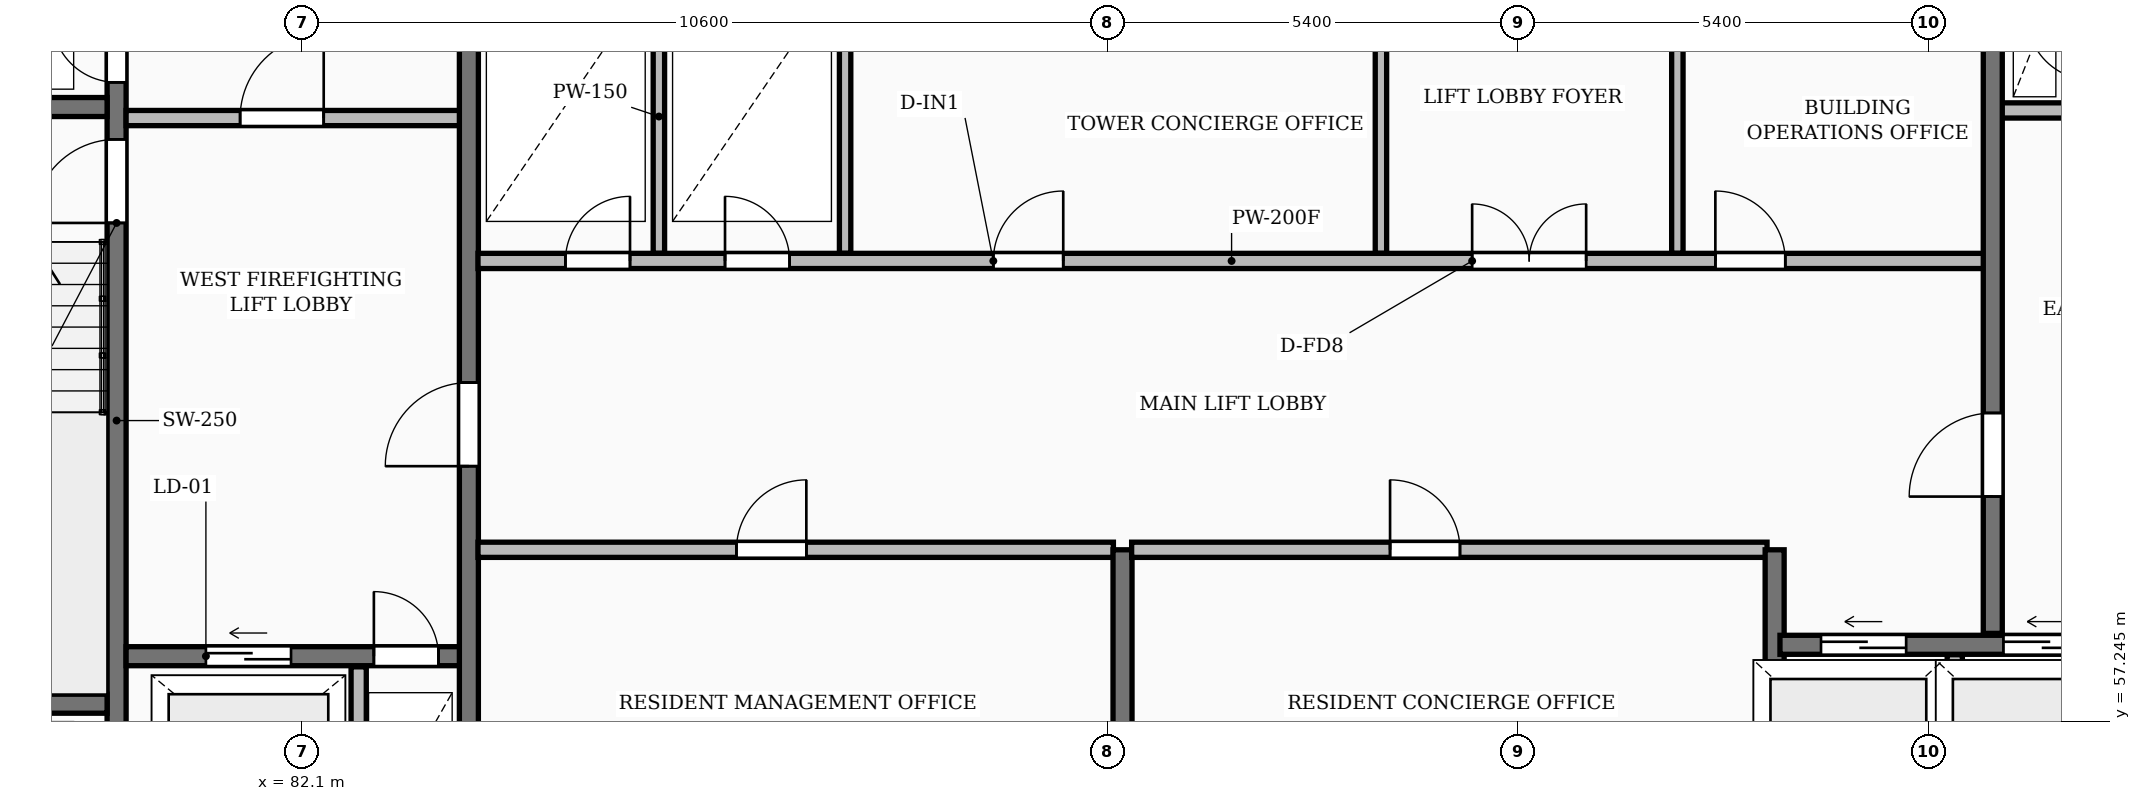
"""IFC4 building model, lengths in metres.
Left out: names, types, materials, properties, quantities, classifications, styles, units other than length and angle.
Written with IfcOpenShell. Run it as: python <this file> out.ifc"""

import sys

from ifc_helpers import new_model, si_unit, direction, frame, frame_2d, origin, place, context, subcontext, project, spatial, rectangle, extrude, element, fill, save


model = new_model("IFC4")
c1 = context("Model", 3, precision=1e-05, world=origin(), true_north=direction((0.0, 1.0)))
c2 = subcontext(c1, "Body", "Model", "MODEL_VIEW")
j1 = project(units=[si_unit("LENGTHUNIT", "METRE"), si_unit("PLANEANGLEUNIT", "RADIAN")], contexts=[c1])
p1 = place(None, origin())
s1 = spatial("IfcSite", under=j1, at=p1, CompositionType="ELEMENT")
p2 = place(p1, origin())
s2 = spatial("IfcBuilding", under=s1, at=p2, CompositionType="ELEMENT")
p3 = place(p2, frame((0.0, 0.0, 188.1)))
s3 = spatial("IfcBuildingStorey", under=s2, at=p3, CompositionType="ELEMENT", Elevation=188.1)
p4 = place(p3, frame((79.665, 55.4, 0.0), z_axis=(0.0, 0.0, 1.0), x_axis=(0.0, 1.0, 0.0)))
e1 = element("IfcWall", 1, at=p4, inside=s3, PredefinedType="SHEAR", context=c2, shape_type="SweptSolid", body=[
    extrude(rectangle(XDim=11.6, YDim=0.25, at=frame_2d((5.8, 0.0))), origin(), (0.0, 0.0, 1.0), 3.25),
])
p5 = place(p4, frame((0.55, 0.0, 0.0)))
e2 = element("IfcOpeningElement", 2, at=p5, cuts=e1, PredefinedType="OPENING", context=c2, shape_type="SweptSolid", body=[
    extrude(rectangle(XDim=0.85, YDim=2.05, at=frame_2d((0.425, 1.025))), frame((0.0, 0.135, 0.0), z_axis=(0.0, -1.0, 0.0), x_axis=(1.0, 0.0, 0.0)), (0.0, 0.0, 1.0), 0.27),
])
p6 = place(p4, frame((8.4, 0.0, 0.0)))
e3 = element("IfcOpeningElement", 3, at=p6, cuts=e1, PredefinedType="OPENING", context=c2, shape_type="SweptSolid", body=[
    extrude(rectangle(XDim=1.1, YDim=2.1, at=frame_2d((0.55, 1.05))), frame((0.0, 0.135, 0.0), z_axis=(0.0, -1.0, 0.0), x_axis=(1.0, 0.0, 0.0)), (0.0, 0.0, 1.0), 0.27),
])
p7 = place(p4, frame((10.25, 0.0, 0.0)))
e4 = element("IfcOpeningElement", 4, at=p7, cuts=e1, PredefinedType="OPENING", context=c2, shape_type="SweptSolid", body=[
    extrude(rectangle(XDim=0.85, YDim=2.05, at=frame_2d((0.425, 1.025))), frame((0.0, 0.135, 0.0), z_axis=(0.0, -1.0, 0.0), x_axis=(1.0, 0.0, 0.0)), (0.0, 0.0, 1.0), 0.27),
])
for number, where, z_axis, x_axis in (
    (5, (76.3, 57.475, 0.0), (0.0, 0.0, 1.0), (1.0, 0.0, 0.0)),
    (6, (76.3, 65.325, 0.0), (0.0, 0.0, 1.0), (1.0, 0.0, 0.0)),
):
    element("IfcWall", number, at=place(p3, frame(where, z_axis=z_axis, x_axis=x_axis)), inside=s3, PredefinedType="SHEAR", context=c2, shape_type="SweptSolid", body=[
        extrude(rectangle(XDim=3.24, YDim=0.25, at=frame_2d((1.62, 0.0))), origin(), (0.0, 0.0, 1.0), 3.25),
    ])
p8 = place(p3, frame((79.79, 58.1, 0.0), z_axis=(0.0, 0.0, 1.0), x_axis=(1.0, 0.0, 0.0)))
e7 = element("IfcWall", 7, at=p8, inside=s3, PredefinedType="SHEAR", context=c2, shape_type="SweptSolid", body=[
    extrude(rectangle(XDim=4.39, YDim=0.25, at=frame_2d((2.195, 0.0))), origin(), (0.0, 0.0, 1.0), 3.25),
])
p9 = place(p8, frame((1.05, 0.0, 0.0)))
e8 = element("IfcOpeningElement", 8, at=p9, cuts=e7, PredefinedType="OPENING", context=c2, shape_type="SweptSolid", body=[
    extrude(rectangle(XDim=1.12, YDim=2.12, at=frame_2d((0.56, 1.06))), frame((0.0, 0.135, 0.0), z_axis=(0.0, -1.0, 0.0), x_axis=(1.0, 0.0, 0.0)), (0.0, 0.0, 1.0), 0.27),
])
p10 = place(p8, frame((3.26, 0.0, 0.0)))
e9 = element("IfcOpeningElement", 9, at=p10, cuts=e7, PredefinedType="OPENING", context=c2, shape_type="SweptSolid", body=[
    extrude(rectangle(XDim=0.85, YDim=2.05, at=frame_2d((0.425, 1.025))), frame((0.0, 0.135, 0.0), z_axis=(0.0, -1.0, 0.0), x_axis=(1.0, 0.0, 0.0)), (0.0, 0.0, 1.0), 0.27),
])
p11 = place(p3, frame((82.85, 55.4, 0.0), z_axis=(0.0, 0.0, 1.0), x_axis=(0.0, 1.0, 0.0)))
e10 = element("IfcWall", 10, at=p11, inside=s3, PredefinedType="PARTITIONING", context=c2, shape_type="SweptSolid", body=[
    extrude(rectangle(XDim=2.56, YDim=0.2, at=frame_2d((1.28, 0.0))), origin(), (0.0, 0.0, 1.0), 2.97),
])
p12 = place(p3, frame((79.79, 65.18, 0.0), z_axis=(0.0, 0.0, 1.0), x_axis=(1.0, 0.0, 0.0)))
e11 = element("IfcWall", 11, at=p12, inside=s3, PredefinedType="PARTITIONING", context=c2, shape_type="SweptSolid", body=[
    extrude(rectangle(XDim=4.39, YDim=0.2, at=frame_2d((2.195, 0.0))), origin(), (0.0, 0.0, 1.0), 2.97),
])
p13 = place(p12, frame((1.5, 0.0, 0.0)))
e12 = element("IfcOpeningElement", 12, at=p13, cuts=e11, PredefinedType="OPENING", context=c2, shape_type="SweptSolid", body=[
    extrude(rectangle(XDim=1.1, YDim=2.1, at=frame_2d((0.55, 1.05))), frame((0.0, 0.11, 0.0), z_axis=(0.0, -1.0, 0.0), x_axis=(1.0, 0.0, 0.0)), (0.0, 0.0, 1.0), 0.22),
])
p14 = place(p3, frame((84.3, 55.4, 0.0), z_axis=(0.0, 0.0, 1.0), x_axis=(0.0, 1.0, 0.0)))
e13 = element("IfcWall", 13, at=p14, inside=s3, PredefinedType="SHEAR", context=c2, shape_type="SweptSolid", body=[
    extrude(rectangle(XDim=11.6, YDim=0.25, at=frame_2d((5.8, 0.0))), origin(), (0.0, 0.0, 1.0), 3.25),
])
p15 = place(p14, frame((5.2, 0.0, 0.0)))
e14 = element("IfcOpeningElement", 14, at=p15, cuts=e13, PredefinedType="OPENING", context=c2, shape_type="SweptSolid", body=[
    extrude(rectangle(XDim=1.1, YDim=2.1, at=frame_2d((0.55, 1.05))), frame((0.0, 0.135, 0.0), z_axis=(0.0, -1.0, 0.0), x_axis=(1.0, 0.0, 0.0)), (0.0, 0.0, 1.0), 0.27),
])
p16 = place(p3, frame((84.42, 59.5, 0.0), z_axis=(0.0, 0.0, 1.0), x_axis=(1.0, 0.0, 0.0)))
e15 = element("IfcWall", 15, at=p16, inside=s3, PredefinedType="PARTITIONING", context=c2, shape_type="SweptSolid", body=[
    extrude(rectangle(XDim=8.36, YDim=0.2, at=frame_2d((4.18, 0.0))), origin(), (0.0, 0.0, 1.0), 2.97),
])
p17 = place(p16, frame((3.4, 0.0, 0.0)))
e16 = element("IfcOpeningElement", 16, at=p17, cuts=e15, PredefinedType="OPENING", context=c2, shape_type="SweptSolid", body=[
    extrude(rectangle(XDim=0.92, YDim=2.08, at=frame_2d((0.46, 1.04))), frame((0.0, 0.11, 0.0), z_axis=(0.0, -1.0, 0.0), x_axis=(1.0, 0.0, 0.0)), (0.0, 0.0, 1.0), 0.22),
])
p18 = place(p3, frame((92.9, 55.4, 0.0), z_axis=(0.0, 0.0, 1.0), x_axis=(0.0, 1.0, 0.0)))
e17 = element("IfcWall", 17, at=p18, inside=s3, PredefinedType="SHEAR", context=c2, shape_type="SweptSolid", body=[
    extrude(rectangle(XDim=4.1, YDim=0.25, at=frame_2d((2.05, 0.0))), origin(), (0.0, 0.0, 1.0), 3.25),
])
p19 = place(p3, frame((93.02, 59.5, 0.0), z_axis=(0.0, 0.0, 1.0), x_axis=(1.0, 0.0, 0.0)))
e18 = element("IfcWall", 18, at=p19, inside=s3, PredefinedType="PARTITIONING", context=c2, shape_type="SweptSolid", body=[
    extrude(rectangle(XDim=8.36, YDim=0.2, at=frame_2d((4.18, 0.0))), origin(), (0.0, 0.0, 1.0), 2.97),
])
p20 = place(p19, frame((3.4, 0.0, 0.0)))
e19 = element("IfcOpeningElement", 19, at=p20, cuts=e18, PredefinedType="OPENING", context=c2, shape_type="SweptSolid", body=[
    extrude(rectangle(XDim=0.92, YDim=2.08, at=frame_2d((0.46, 1.04))), frame((0.0, 0.11, 0.0), z_axis=(0.0, -1.0, 0.0), x_axis=(1.0, 0.0, 0.0)), (0.0, 0.0, 1.0), 0.22),
])
p21 = place(p3, frame((101.48, 55.4, 0.0), z_axis=(0.0, 0.0, 1.0), x_axis=(0.0, 1.0, 0.0)))
e20 = element("IfcWall", 20, at=p21, inside=s3, PredefinedType="SHEAR", context=c2, shape_type="SweptSolid", body=[
    extrude(rectangle(XDim=4.1, YDim=0.25, at=frame_2d((2.05, 0.0))), origin(), (0.0, 0.0, 1.0), 3.25),
])
p22 = place(p3, frame((103.85, 55.4, 0.0), z_axis=(0.0, 0.0, 1.0), x_axis=(0.0, 1.0, 0.0)))
e21 = element("IfcWall", 21, at=p22, inside=s3, PredefinedType="PARTITIONING", context=c2, shape_type="SweptSolid", body=[
    extrude(rectangle(XDim=2.72, YDim=0.2, at=frame_2d((1.36, 0.0))), origin(), (0.0, 0.0, 1.0), 2.97),
])
p23 = place(p3, frame((101.55, 58.25, 0.0), z_axis=(0.0, 0.0, 1.0), x_axis=(1.0, 0.0, 0.0)))
e22 = element("IfcWall", 22, at=p23, inside=s3, PredefinedType="SHEAR", context=c2, shape_type="SweptSolid", body=[
    extrude(rectangle(XDim=4.6, YDim=0.25, at=frame_2d((2.3, 0.0))), origin(), (0.0, 0.0, 1.0), 3.25),
])
p24 = place(p23, frame((0.54, 0.0, 0.0)))
e23 = element("IfcOpeningElement", 23, at=p24, cuts=e22, PredefinedType="OPENING", context=c2, shape_type="SweptSolid", body=[
    extrude(rectangle(XDim=1.12, YDim=2.12, at=frame_2d((0.56, 1.06))), frame((0.0, 0.135, 0.0), z_axis=(0.0, -1.0, 0.0), x_axis=(1.0, 0.0, 0.0)), (0.0, 0.0, 1.0), 0.27),
])
p25 = place(p23, frame((2.94, 0.0, 0.0)))
e24 = element("IfcOpeningElement", 24, at=p25, cuts=e22, PredefinedType="OPENING", context=c2, shape_type="SweptSolid", body=[
    extrude(rectangle(XDim=1.12, YDim=2.12, at=frame_2d((0.56, 1.06))), frame((0.0, 0.135, 0.0), z_axis=(0.0, -1.0, 0.0), x_axis=(1.0, 0.0, 0.0)), (0.0, 0.0, 1.0), 0.27),
])
for number, where, z_axis, x_axis in (
    (25, (86.8, 63.4, 0.0), (0.0, 0.0, 1.0), (0.0, 1.0, 0.0)),
    (26, (89.25, 63.4, 0.0), (0.0, 0.0, 1.0), (0.0, 1.0, 0.0)),
    (27, (96.3, 63.4, 0.0), (0.0, 0.0, 1.0), (0.0, 1.0, 0.0)),
    (28, (100.2, 63.4, 0.0), (0.0, 0.0, 1.0), (0.0, 1.0, 0.0)),
):
    element("IfcWall", number, at=place(p3, frame(where, z_axis=z_axis, x_axis=x_axis)), inside=s3, PredefinedType="PARTITIONING", context=c2, shape_type="SweptSolid", body=[
        extrude(rectangle(XDim=3.6, YDim=0.15, at=frame_2d((1.8, 0.0))), origin(), (0.0, 0.0, 1.0), 2.97),
    ])
p26 = place(p3, frame((84.42, 63.3, 0.0), z_axis=(0.0, 0.0, 1.0), x_axis=(1.0, 0.0, 0.0)))
e29 = element("IfcWall", 29, at=p26, inside=s3, PredefinedType="PARTITIONING", context=c2, shape_type="SweptSolid", body=[
    extrude(rectangle(XDim=19.83, YDim=0.2, at=frame_2d((9.915, 0.0))), origin(), (0.0, 0.0, 1.0), 2.97),
])
p27 = place(p26, frame((1.15, 0.0, 0.0)))
e30 = element("IfcOpeningElement", 30, at=p27, cuts=e29, PredefinedType="OPENING", context=c2, shape_type="SweptSolid", body=[
    extrude(rectangle(XDim=0.85, YDim=2.05, at=frame_2d((0.425, 1.025))), frame((0.0, 0.11, 0.0), z_axis=(0.0, -1.0, 0.0), x_axis=(1.0, 0.0, 0.0)), (0.0, 0.0, 1.0), 0.22),
])
p28 = place(p26, frame((3.25, 0.0, 0.0)))
e31 = element("IfcOpeningElement", 31, at=p28, cuts=e29, PredefinedType="OPENING", context=c2, shape_type="SweptSolid", body=[
    extrude(rectangle(XDim=0.85, YDim=2.05, at=frame_2d((0.425, 1.025))), frame((0.0, 0.11, 0.0), z_axis=(0.0, -1.0, 0.0), x_axis=(1.0, 0.0, 0.0)), (0.0, 0.0, 1.0), 0.22),
])
p29 = place(p26, frame((13.08, 0.0, 0.0)))
e32 = element("IfcOpeningElement", 32, at=p29, cuts=e29, PredefinedType="OPENING", context=c2, shape_type="SweptSolid", body=[
    extrude(rectangle(XDim=1.5, YDim=2.2, at=frame_2d((0.75, 1.1))), frame((0.0, 0.11, 0.0), z_axis=(0.0, -1.0, 0.0), x_axis=(1.0, 0.0, 0.0)), (0.0, 0.0, 1.0), 0.22),
])
p30 = place(p26, frame((6.78, 0.0, 0.0)))
e33 = element("IfcOpeningElement", 33, at=p30, cuts=e29, PredefinedType="OPENING", context=c2, shape_type="SweptSolid", body=[
    extrude(rectangle(XDim=0.92, YDim=2.08, at=frame_2d((0.46, 1.04))), frame((0.0, 0.11, 0.0), z_axis=(0.0, -1.0, 0.0), x_axis=(1.0, 0.0, 0.0)), (0.0, 0.0, 1.0), 0.22),
])
p31 = place(p26, frame((16.28, 0.0, 0.0)))
e34 = element("IfcOpeningElement", 34, at=p31, cuts=e29, PredefinedType="OPENING", context=c2, shape_type="SweptSolid", body=[
    extrude(rectangle(XDim=0.92, YDim=2.08, at=frame_2d((0.46, 1.04))), frame((0.0, 0.11, 0.0), z_axis=(0.0, -1.0, 0.0), x_axis=(1.0, 0.0, 0.0)), (0.0, 0.0, 1.0), 0.22),
])
p32 = place(p3, frame((104.45, 65.28, 0.0), z_axis=(0.0, 0.0, 1.0), x_axis=(1.0, 0.0, 0.0)))
e35 = element("IfcWall", 35, at=p32, inside=s3, PredefinedType="PARTITIONING", context=c2, shape_type="SweptSolid", body=[
    extrude(rectangle(XDim=1.2, YDim=0.2, at=frame_2d((0.6, 0.0))), origin(), (0.0, 0.0, 1.0), 2.97),
])
p33 = place(p3, frame((104.35, 58.4, 0.0), z_axis=(0.0, 0.0, 1.0), x_axis=(0.0, 1.0, 0.0)))
e36 = element("IfcWall", 36, at=p33, inside=s3, PredefinedType="SHEAR", context=c2, shape_type="SweptSolid", body=[
    extrude(rectangle(XDim=8.6, YDim=0.25, at=frame_2d((4.3, 0.0))), origin(), (0.0, 0.0, 1.0), 3.25),
])
p34 = place(p33, frame((1.8, 0.0, 0.0)))
e37 = element("IfcOpeningElement", 37, at=p34, cuts=e36, PredefinedType="OPENING", context=c2, shape_type="SweptSolid", body=[
    extrude(rectangle(XDim=1.1, YDim=2.1, at=frame_2d((0.55, 1.05))), frame((0.0, 0.135, 0.0), z_axis=(0.0, -1.0, 0.0), x_axis=(1.0, 0.0, 0.0)), (0.0, 0.0, 1.0), 0.27),
])
p35 = place(p6, origin())
e38 = element("IfcDoor", 38, at=p35, inside=s3, OperationType="SINGLE_SWING_LEFT", PredefinedType="DOOR", context=c2, shape_type="SweptSolid", body=[
    extrude(rectangle(XDim=1.1, YDim=2.1, at=frame_2d((0.55, 1.05))), frame((0.0, 0.025, 0.0), z_axis=(0.0, -1.0, 0.0), x_axis=(1.0, 0.0, 0.0)), (0.0, 0.0, 1.0), 0.05),
])
fill(e3, e38)
p36 = place(p7, origin())
e39 = element("IfcDoor", 39, at=p36, inside=s3, OperationType="SINGLE_SWING_RIGHT", PredefinedType="DOOR", context=c2, shape_type="SweptSolid", body=[
    extrude(rectangle(XDim=0.85, YDim=2.05, at=frame_2d((0.425, 1.025))), frame((0.0, 0.025, 0.0), z_axis=(0.0, -1.0, 0.0), x_axis=(1.0, 0.0, 0.0)), (0.0, 0.0, 1.0), 0.05),
])
fill(e4, e39)
p37 = place(p9, origin())
e40 = element("IfcDoor", 40, at=p37, inside=s3, OperationType="SLIDING_TO_LEFT", PredefinedType="DOOR", context=c2, shape_type="SweptSolid", body=[
    extrude(rectangle(XDim=1.12, YDim=2.12, at=frame_2d((0.56, 1.06))), frame((0.0, 0.025, 0.0), z_axis=(0.0, -1.0, 0.0), x_axis=(1.0, 0.0, 0.0)), (0.0, 0.0, 1.0), 0.05),
])
fill(e8, e40)
p38 = place(p10, origin())
e41 = element("IfcDoor", 41, at=p38, inside=s3, OperationType="SINGLE_SWING_LEFT", PredefinedType="DOOR", context=c2, shape_type="SweptSolid", body=[
    extrude(rectangle(XDim=0.85, YDim=2.05, at=frame_2d((0.425, 1.025))), frame((0.0, 0.025, 0.0), z_axis=(0.0, -1.0, 0.0), x_axis=(1.0, 0.0, 0.0)), (0.0, 0.0, 1.0), 0.05),
])
fill(e9, e41)
p39 = place(p13, origin())
e42 = element("IfcDoor", 42, at=p39, inside=s3, OperationType="SINGLE_SWING_RIGHT", PredefinedType="DOOR", context=c2, shape_type="SweptSolid", body=[
    extrude(rectangle(XDim=1.1, YDim=2.1, at=frame_2d((0.55, 1.05))), frame((0.0, 0.025, 0.0), z_axis=(0.0, -1.0, 0.0), x_axis=(1.0, 0.0, 0.0)), (0.0, 0.0, 1.0), 0.05),
])
fill(e12, e42)
p40 = place(p15, origin())
e43 = element("IfcDoor", 43, at=p40, inside=s3, OperationType="SINGLE_SWING_LEFT", PredefinedType="DOOR", context=c2, shape_type="SweptSolid", body=[
    extrude(rectangle(XDim=1.1, YDim=2.1, at=frame_2d((0.55, 1.05))), frame((0.0, 0.025, 0.0), z_axis=(0.0, -1.0, 0.0), x_axis=(1.0, 0.0, 0.0)), (0.0, 0.0, 1.0), 0.05),
])
fill(e14, e43)
p41 = place(p17, origin())
e44 = element("IfcDoor", 44, at=p41, inside=s3, OperationType="SINGLE_SWING_RIGHT", PredefinedType="DOOR", context=c2, shape_type="SweptSolid", body=[
    extrude(rectangle(XDim=0.92, YDim=2.08, at=frame_2d((0.46, 1.04))), frame((0.0, 0.025, 0.0), z_axis=(0.0, -1.0, 0.0), x_axis=(1.0, 0.0, 0.0)), (0.0, 0.0, 1.0), 0.05),
])
fill(e16, e44)
p42 = place(p20, origin())
e45 = element("IfcDoor", 45, at=p42, inside=s3, OperationType="SINGLE_SWING_LEFT", PredefinedType="DOOR", context=c2, shape_type="SweptSolid", body=[
    extrude(rectangle(XDim=0.92, YDim=2.08, at=frame_2d((0.46, 1.04))), frame((0.0, 0.025, 0.0), z_axis=(0.0, -1.0, 0.0), x_axis=(1.0, 0.0, 0.0)), (0.0, 0.0, 1.0), 0.05),
])
fill(e19, e45)
p43 = place(p24, origin())
e46 = element("IfcDoor", 46, at=p43, inside=s3, OperationType="SLIDING_TO_LEFT", PredefinedType="DOOR", context=c2, shape_type="SweptSolid", body=[
    extrude(rectangle(XDim=1.12, YDim=2.12, at=frame_2d((0.56, 1.06))), frame((0.0, 0.025, 0.0), z_axis=(0.0, -1.0, 0.0), x_axis=(1.0, 0.0, 0.0)), (0.0, 0.0, 1.0), 0.05),
])
fill(e23, e46)
p44 = place(p25, origin())
e47 = element("IfcDoor", 47, at=p44, inside=s3, OperationType="SLIDING_TO_LEFT", PredefinedType="DOOR", context=c2, shape_type="SweptSolid", body=[
    extrude(rectangle(XDim=1.12, YDim=2.12, at=frame_2d((0.56, 1.06))), frame((0.0, 0.025, 0.0), z_axis=(0.0, -1.0, 0.0), x_axis=(1.0, 0.0, 0.0)), (0.0, 0.0, 1.0), 0.05),
])
fill(e24, e47)
p45 = place(p27, origin())
e48 = element("IfcDoor", 48, at=p45, inside=s3, OperationType="SINGLE_SWING_RIGHT", PredefinedType="DOOR", context=c2, shape_type="SweptSolid", body=[
    extrude(rectangle(XDim=0.85, YDim=2.05, at=frame_2d((0.425, 1.025))), frame((0.0, 0.025, 0.0), z_axis=(0.0, -1.0, 0.0), x_axis=(1.0, 0.0, 0.0)), (0.0, 0.0, 1.0), 0.05),
])
fill(e30, e48)
p46 = place(p28, origin())
e49 = element("IfcDoor", 49, at=p46, inside=s3, OperationType="SINGLE_SWING_LEFT", PredefinedType="DOOR", context=c2, shape_type="SweptSolid", body=[
    extrude(rectangle(XDim=0.85, YDim=2.05, at=frame_2d((0.425, 1.025))), frame((0.0, 0.025, 0.0), z_axis=(0.0, -1.0, 0.0), x_axis=(1.0, 0.0, 0.0)), (0.0, 0.0, 1.0), 0.05),
])
fill(e31, e49)
p47 = place(p29, origin())
e50 = element("IfcDoor", 50, at=p47, inside=s3, OperationType="DOUBLE_DOOR_SINGLE_SWING", PredefinedType="DOOR", context=c2, shape_type="SweptSolid", body=[
    extrude(rectangle(XDim=1.5, YDim=2.2, at=frame_2d((0.75, 1.1))), frame((0.0, 0.025, 0.0), z_axis=(0.0, -1.0, 0.0), x_axis=(1.0, 0.0, 0.0)), (0.0, 0.0, 1.0), 0.05),
])
fill(e32, e50)
p48 = place(p30, origin())
e51 = element("IfcDoor", 51, at=p48, inside=s3, OperationType="SINGLE_SWING_RIGHT", PredefinedType="DOOR", context=c2, shape_type="SweptSolid", body=[
    extrude(rectangle(XDim=0.92, YDim=2.08, at=frame_2d((0.46, 1.04))), frame((0.0, 0.025, 0.0), z_axis=(0.0, -1.0, 0.0), x_axis=(1.0, 0.0, 0.0)), (0.0, 0.0, 1.0), 0.05),
])
fill(e33, e51)
p49 = place(p31, origin())
e52 = element("IfcDoor", 52, at=p49, inside=s3, OperationType="SINGLE_SWING_LEFT", PredefinedType="DOOR", context=c2, shape_type="SweptSolid", body=[
    extrude(rectangle(XDim=0.92, YDim=2.08, at=frame_2d((0.46, 1.04))), frame((0.0, 0.025, 0.0), z_axis=(0.0, -1.0, 0.0), x_axis=(1.0, 0.0, 0.0)), (0.0, 0.0, 1.0), 0.05),
])
fill(e34, e52)
p50 = place(p34, origin())
e53 = element("IfcDoor", 53, at=p50, inside=s3, OperationType="SINGLE_SWING_LEFT", PredefinedType="DOOR", context=c2, shape_type="SweptSolid", body=[
    extrude(rectangle(XDim=1.1, YDim=2.1, at=frame_2d((0.55, 1.05))), frame((0.0, 0.025, 0.0), z_axis=(0.0, -1.0, 0.0), x_axis=(1.0, 0.0, 0.0)), (0.0, 0.0, 1.0), 0.05),
])
fill(e37, e53)
save(model, sys.argv[1])
